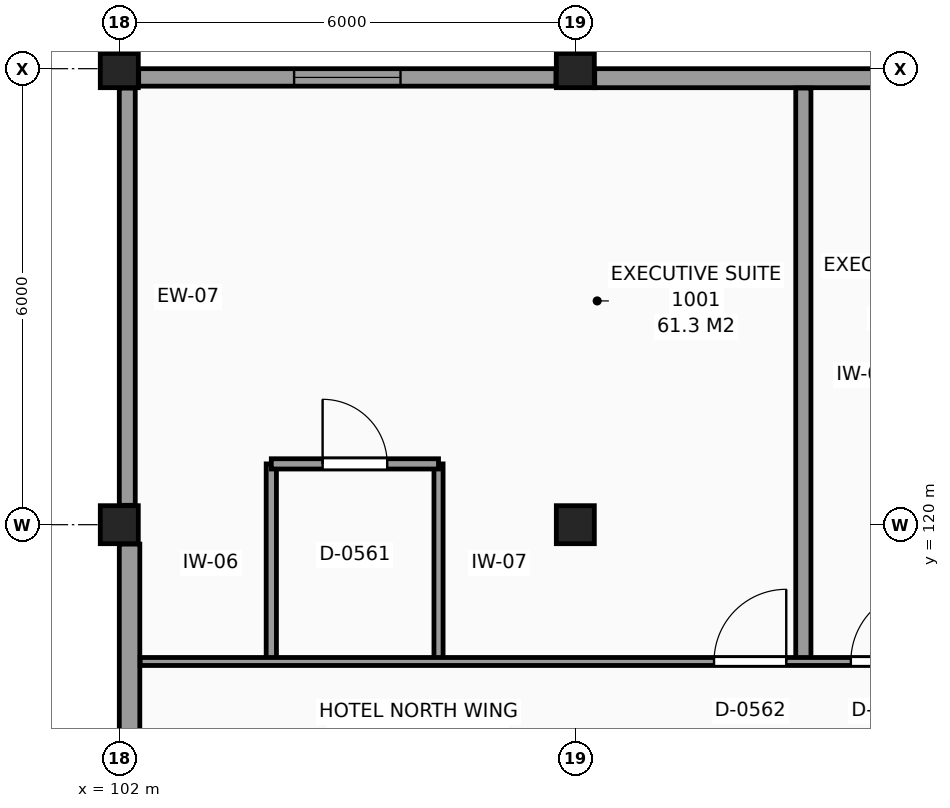
"""IFC4 building model, lengths in metres.
Left out: names, types, materials, properties, quantities, classifications, styles, units other than length and angle.
Written with IfcOpenShell. Run it as: python <this file> out.ifc"""

import sys

from ifc_helpers import new_model, si_unit, direction, frame, frame_2d, origin, origin_2d, place, context, subcontext, project, spatial, rectangle, extrude, element, fill, save


model = new_model("IFC4")
c1 = context("Model", 3, precision=1e-05, world=origin(), true_north=direction((0.0, 1.0)))
c2 = subcontext(c1, "Body", "Model", "MODEL_VIEW")
j1 = project(units=[si_unit("LENGTHUNIT", "METRE"), si_unit("PLANEANGLEUNIT", "RADIAN")], contexts=[c1])
p1 = place(None, origin())
s1 = spatial("IfcSite", under=j1, at=p1, CompositionType="ELEMENT")
p2 = place(p1, origin())
s2 = spatial("IfcBuilding", under=s1, at=p2, CompositionType="ELEMENT")
p3 = place(p2, frame((0.0, 0.0, 41.4)))
s3 = spatial("IfcBuildingStorey", under=s2, at=p3, CompositionType="ELEMENT", Elevation=41.4)
for number, where, z_axis, x_axis in (
    (1, (102.0, 120.0, 0.0), (0.0, 0.0, 1.0), (1.0, 0.0, 0.0)),
    (2, (102.0, 126.0, 0.0), (0.0, 0.0, 1.0), (1.0, 0.0, 0.0)),
    (3, (108.0, 120.0, 0.0), (0.0, 0.0, 1.0), (1.0, 0.0, 0.0)),
    (4, (108.0, 126.0, 0.0), (0.0, 0.0, 1.0), (1.0, 0.0, 0.0)),
):
    element("IfcColumn", number, at=place(p3, frame(where, z_axis=z_axis, x_axis=x_axis)), inside=s3, PredefinedType="COLUMN", context=c2, shape_type="SweptSolid", body=[
        extrude(rectangle(XDim=0.5, YDim=0.5, at=origin_2d()), origin(), (0.0, 0.0, 1.0), 3.3),
    ])
p4 = place(p3, frame((113.745, 125.875, 0.0), z_axis=(0.0, 0.0, 1.0), x_axis=(-1.0, 0.0, 0.0)))
e5 = element("IfcWall", 5, at=p4, inside=s3, PredefinedType="SOLIDWALL", context=c2, shape_type="SweptSolid", body=[
    extrude(rectangle(XDim=5.49, YDim=0.25, at=frame_2d((2.745, 0.0))), origin(), (0.0, 0.0, 1.0), 2.41),
])
p5 = place(p3, frame((107.745, 125.885, 0.0), z_axis=(0.0, 0.0, 1.0), x_axis=(-1.0, 0.0, 0.0)))
e6 = element("IfcWall", 6, at=p5, inside=s3, PredefinedType="SOLIDWALL", context=c2, shape_type="SweptSolid", body=[
    extrude(rectangle(XDim=5.49, YDim=0.23, at=frame_2d((2.745, 0.0))), origin(), (0.0, 0.0, 1.0), 2.41),
])
p6 = place(p5, frame((2.045, 0.0, 0.8)))
e7 = element("IfcOpeningElement", 7, at=p6, cuts=e6, PredefinedType="OPENING", context=c2, shape_type="SweptSolid", body=[
    extrude(rectangle(XDim=1.4, YDim=1.4, at=frame_2d((0.7, 0.7))), frame((0.0, 0.125, 0.0), z_axis=(0.0, -1.0, 0.0), x_axis=(1.0, 0.0, 0.0)), (0.0, 0.0, 1.0), 0.25),
])
p7 = place(p3, frame((102.105, 125.745, 0.0), z_axis=(0.0, 0.0, 1.0), x_axis=(0.0, -1.0, 0.0)))
e8 = element("IfcWall", 8, at=p7, inside=s3, PredefinedType="SOLIDWALL", context=c2, shape_type="SweptSolid", body=[
    extrude(rectangle(XDim=5.49, YDim=0.21, at=frame_2d((2.745, 0.0))), origin(), (0.0, 0.0, 1.0), 2.26),
])
p8 = place(p3, frame((102.135, 119.745, 0.0), z_axis=(0.0, 0.0, 1.0), x_axis=(0.0, -1.0, 0.0)))
e9 = element("IfcWall", 9, at=p8, inside=s3, PredefinedType="SOLIDWALL", context=c2, shape_type="SweptSolid", body=[
    extrude(rectangle(XDim=5.49, YDim=0.27, at=frame_2d((2.745, 0.0))), origin(), (0.0, 0.0, 1.0), 2.26),
])
p9 = place(p3, frame((104.0, 118.2, 0.0), z_axis=(0.0, 0.0, 1.0), x_axis=(0.0, 1.0, 0.0)))
e10 = element("IfcWall", 10, at=p9, inside=s3, PredefinedType="PARTITIONING", context=c2, shape_type="SweptSolid", body=[
    extrude(rectangle(XDim=2.6, YDim=0.135, at=frame_2d((1.3, 0.0))), origin(), (0.0, 0.0, 1.0), 3.06),
])
p10 = place(p3, frame((106.2, 118.2, 0.0), z_axis=(0.0, 0.0, 1.0), x_axis=(0.0, 1.0, 0.0)))
e11 = element("IfcWall", 11, at=p10, inside=s3, PredefinedType="PARTITIONING", context=c2, shape_type="SweptSolid", body=[
    extrude(rectangle(XDim=2.6, YDim=0.12, at=frame_2d((1.3, 0.0))), origin(), (0.0, 0.0, 1.0), 3.06),
])
p11 = place(p3, frame((111.0, 118.2, 0.0), z_axis=(0.0, 0.0, 1.0), x_axis=(0.0, 1.0, 0.0)))
e12 = element("IfcWall", 12, at=p11, inside=s3, PredefinedType="PARTITIONING", context=c2, shape_type="SweptSolid", body=[
    extrude(rectangle(XDim=7.545, YDim=0.2, at=frame_2d((3.772, 0.0))), origin(), (0.0, 0.0, 1.0), 3.06),
])
p12 = place(p3, frame((102.275, 118.2, 0.0), z_axis=(0.0, 0.0, 1.0), x_axis=(1.0, 0.0, 0.0)))
e13 = element("IfcWall", 13, at=p12, inside=s3, PredefinedType="PARTITIONING", context=c2, shape_type="SweptSolid", body=[
    extrude(rectangle(XDim=74.225, YDim=0.105, at=frame_2d((37.113, 0.0))), origin(), (0.0, 0.0, 1.0), 3.06),
])
p13 = place(p12, frame((7.55, 0.0, 0.0)))
e14 = element("IfcOpeningElement", 14, at=p13, cuts=e13, PredefinedType="OPENING", context=c2, shape_type="SweptSolid", body=[
    extrude(rectangle(XDim=0.95, YDim=2.1, at=frame_2d((0.475, 1.05))), frame((0.0, 0.062, 0.0), z_axis=(0.0, -1.0, 0.0), x_axis=(1.0, 0.0, 0.0)), (0.0, 0.0, 1.0), 0.125),
])
p14 = place(p12, frame((9.35, 0.0, 0.0)))
e15 = element("IfcOpeningElement", 15, at=p14, cuts=e13, PredefinedType="OPENING", context=c2, shape_type="SweptSolid", body=[
    extrude(rectangle(XDim=0.95, YDim=2.1, at=frame_2d((0.475, 1.05))), frame((0.0, 0.062, 0.0), z_axis=(0.0, -1.0, 0.0), x_axis=(1.0, 0.0, 0.0)), (0.0, 0.0, 1.0), 0.125),
])
p15 = place(p12, frame((24.05, 0.0, 0.0)))
e16 = element("IfcOpeningElement", 16, at=p15, cuts=e13, PredefinedType="OPENING", context=c2, shape_type="SweptSolid", body=[
    extrude(rectangle(XDim=0.95, YDim=2.1, at=frame_2d((0.475, 1.05))), frame((0.0, 0.062, 0.0), z_axis=(0.0, -1.0, 0.0), x_axis=(1.0, 0.0, 0.0)), (0.0, 0.0, 1.0), 0.125),
])
p16 = place(p12, frame((28.25, 0.0, 0.0)))
e17 = element("IfcOpeningElement", 17, at=p16, cuts=e13, PredefinedType="OPENING", context=c2, shape_type="SweptSolid", body=[
    extrude(rectangle(XDim=0.95, YDim=2.1, at=frame_2d((0.475, 1.05))), frame((0.0, 0.062, 0.0), z_axis=(0.0, -1.0, 0.0), x_axis=(1.0, 0.0, 0.0)), (0.0, 0.0, 1.0), 0.125),
])
p17 = place(p12, frame((30.45, 0.0, 0.0)))
e18 = element("IfcOpeningElement", 18, at=p17, cuts=e13, PredefinedType="OPENING", context=c2, shape_type="SweptSolid", body=[
    extrude(rectangle(XDim=0.95, YDim=2.1, at=frame_2d((0.475, 1.05))), frame((0.0, 0.062, 0.0), z_axis=(0.0, -1.0, 0.0), x_axis=(1.0, 0.0, 0.0)), (0.0, 0.0, 1.0), 0.125),
])
p18 = place(p12, frame((36.45, 0.0, 0.0)))
e19 = element("IfcOpeningElement", 19, at=p18, cuts=e13, PredefinedType="OPENING", context=c2, shape_type="SweptSolid", body=[
    extrude(rectangle(XDim=0.95, YDim=2.1, at=frame_2d((0.475, 1.05))), frame((0.0, 0.062, 0.0), z_axis=(0.0, -1.0, 0.0), x_axis=(1.0, 0.0, 0.0)), (0.0, 0.0, 1.0), 0.125),
])
p19 = place(p12, frame((46.25, 0.0, 0.0)))
e20 = element("IfcOpeningElement", 20, at=p19, cuts=e13, PredefinedType="OPENING", context=c2, shape_type="SweptSolid", body=[
    extrude(rectangle(XDim=0.95, YDim=2.1, at=frame_2d((0.475, 1.05))), frame((0.0, 0.062, 0.0), z_axis=(0.0, -1.0, 0.0), x_axis=(1.0, 0.0, 0.0)), (0.0, 0.0, 1.0), 0.125),
])
p20 = place(p12, frame((48.45, 0.0, 0.0)))
e21 = element("IfcOpeningElement", 21, at=p20, cuts=e13, PredefinedType="OPENING", context=c2, shape_type="SweptSolid", body=[
    extrude(rectangle(XDim=0.95, YDim=2.1, at=frame_2d((0.475, 1.05))), frame((0.0, 0.062, 0.0), z_axis=(0.0, -1.0, 0.0), x_axis=(1.0, 0.0, 0.0)), (0.0, 0.0, 1.0), 0.125),
])
p21 = place(p12, frame((62.3, 0.0, 0.0)))
e22 = element("IfcOpeningElement", 22, at=p21, cuts=e13, PredefinedType="OPENING", context=c2, shape_type="SweptSolid", body=[
    extrude(rectangle(XDim=0.95, YDim=2.1, at=frame_2d((0.475, 1.05))), frame((0.0, 0.062, 0.0), z_axis=(0.0, -1.0, 0.0), x_axis=(1.0, 0.0, 0.0)), (0.0, 0.0, 1.0), 0.125),
])
p22 = place(p12, frame((64.85, 0.0, 0.0)))
e23 = element("IfcOpeningElement", 23, at=p22, cuts=e13, PredefinedType="OPENING", context=c2, shape_type="SweptSolid", body=[
    extrude(rectangle(XDim=0.95, YDim=2.1, at=frame_2d((0.475, 1.05))), frame((0.0, 0.062, 0.0), z_axis=(0.0, -1.0, 0.0), x_axis=(1.0, 0.0, 0.0)), (0.0, 0.0, 1.0), 0.125),
])
p23 = place(p12, frame((68.95, 0.0, 0.0)))
e24 = element("IfcOpeningElement", 24, at=p23, cuts=e13, PredefinedType="OPENING", context=c2, shape_type="SweptSolid", body=[
    extrude(rectangle(XDim=0.95, YDim=2.1, at=frame_2d((0.475, 1.05))), frame((0.0, 0.062, 0.0), z_axis=(0.0, -1.0, 0.0), x_axis=(1.0, 0.0, 0.0)), (0.0, 0.0, 1.0), 0.125),
])
p24 = place(p3, frame((104.0, 120.8, 0.0), z_axis=(0.0, 0.0, 1.0), x_axis=(1.0, 0.0, 0.0)))
e25 = element("IfcWall", 25, at=p24, inside=s3, PredefinedType="PARTITIONING", context=c2, shape_type="SweptSolid", body=[
    extrude(rectangle(XDim=2.2, YDim=0.135, at=frame_2d((1.1, 0.0))), origin(), (0.0, 0.0, 1.0), 3.06),
])
p25 = place(p24, frame((0.675, 0.0, 0.0)))
e26 = element("IfcOpeningElement", 26, at=p25, cuts=e25, PredefinedType="OPENING", context=c2, shape_type="SweptSolid", body=[
    extrude(rectangle(XDim=0.85, YDim=2.1, at=frame_2d((0.425, 1.05))), frame((0.0, 0.078, 0.0), z_axis=(0.0, -1.0, 0.0), x_axis=(1.0, 0.0, 0.0)), (0.0, 0.0, 1.0), 0.155),
])
p26 = place(p6, origin())
e27 = element("IfcWindow", 27, at=p26, inside=s3, PartitioningType="SINGLE_PANEL", PredefinedType="WINDOW", context=c2, shape_type="SweptSolid", body=[
    extrude(rectangle(XDim=1.4, YDim=1.4, at=frame_2d((0.7, 0.7))), frame((0.0, 0.03, 0.0), z_axis=(0.0, -1.0, 0.0), x_axis=(1.0, 0.0, 0.0)), (0.0, 0.0, 1.0), 0.06),
])
fill(e7, e27)
p27 = place(p25, origin())
e28 = element("IfcDoor", 28, at=p27, inside=s3, OperationType="SINGLE_SWING_LEFT", PredefinedType="DOOR", context=c2, shape_type="SweptSolid", body=[
    extrude(rectangle(XDim=0.85, YDim=2.1, at=frame_2d((0.425, 1.05))), frame((0.0, 0.025, 0.0), z_axis=(0.0, -1.0, 0.0), x_axis=(1.0, 0.0, 0.0)), (0.0, 0.0, 1.0), 0.05),
])
fill(e26, e28)
p28 = place(p13, origin())
e29 = element("IfcDoor", 29, at=p28, inside=s3, OperationType="SINGLE_SWING_RIGHT", PredefinedType="DOOR", context=c2, shape_type="SweptSolid", body=[
    extrude(rectangle(XDim=0.95, YDim=2.1, at=frame_2d((0.475, 1.05))), frame((0.0, 0.025, 0.0), z_axis=(0.0, -1.0, 0.0), x_axis=(1.0, 0.0, 0.0)), (0.0, 0.0, 1.0), 0.05),
])
fill(e14, e29)
p29 = place(p14, origin())
e30 = element("IfcDoor", 30, at=p29, inside=s3, OperationType="SINGLE_SWING_RIGHT", PredefinedType="DOOR", context=c2, shape_type="SweptSolid", body=[
    extrude(rectangle(XDim=0.95, YDim=2.1, at=frame_2d((0.475, 1.05))), frame((0.0, 0.025, 0.0), z_axis=(0.0, -1.0, 0.0), x_axis=(1.0, 0.0, 0.0)), (0.0, 0.0, 1.0), 0.05),
])
fill(e15, e30)
save(model, sys.argv[1])
